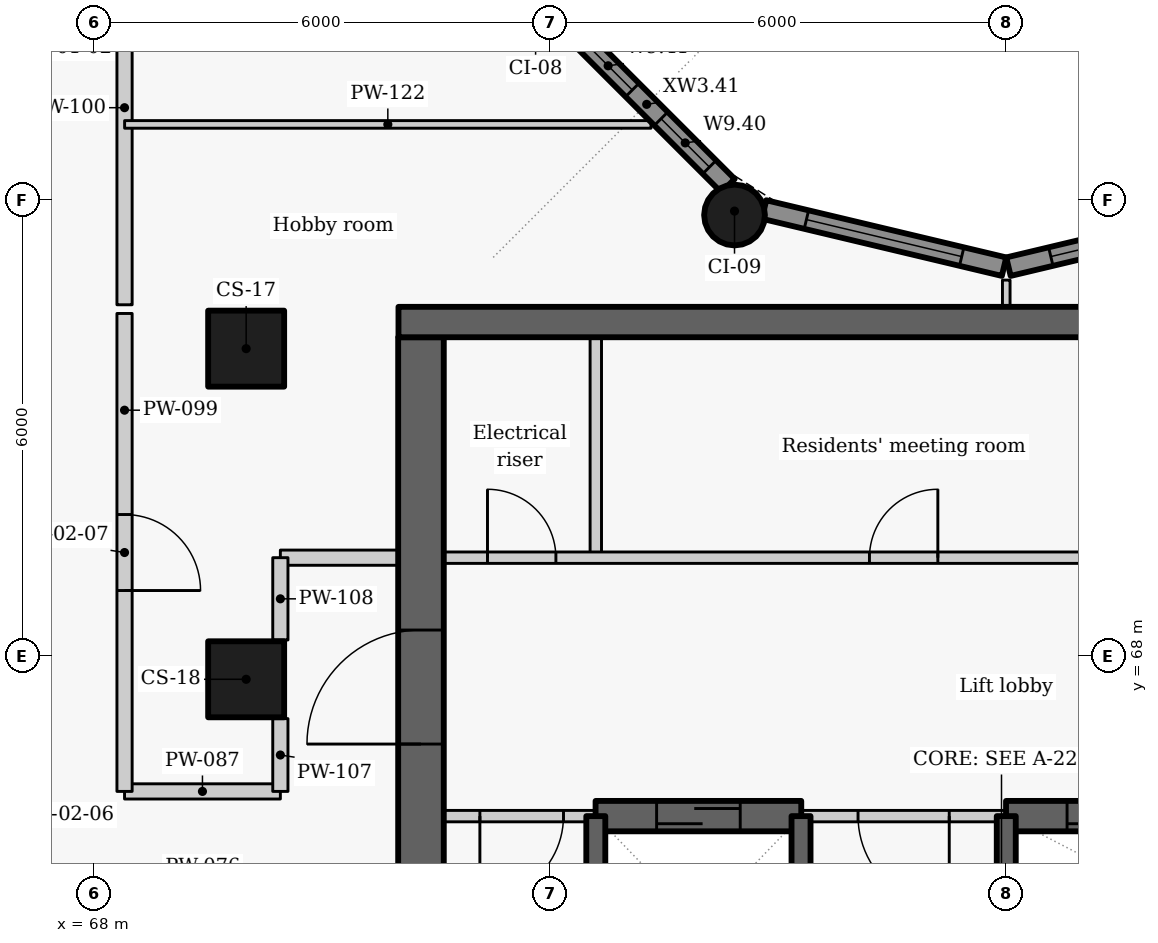
"""IFC4 building model, lengths in metres.
Left out: names, types, materials, properties, quantities, classifications, styles, units other than length and angle.
Written with IfcOpenShell. Run it as: python <this file> out.ifc"""

import sys

from ifc_helpers import new_model, si_unit, direction, frame, frame_2d, origin, origin_2d, place, context, subcontext, project, spatial, rectangle, circle, extrude, element, fill, save


model = new_model("IFC4")
c1 = context("Model", 3, precision=1e-05, world=origin(), true_north=direction((0.0, 1.0)))
c2 = subcontext(c1, "Body", "Model", "MODEL_VIEW")
j1 = project(units=[si_unit("LENGTHUNIT", "METRE"), si_unit("PLANEANGLEUNIT", "RADIAN")], contexts=[c1])
p1 = place(None, origin())
s1 = spatial("IfcSite", under=j1, at=p1, CompositionType="ELEMENT")
p2 = place(p1, origin())
s2 = spatial("IfcBuilding", under=s1, at=p2, CompositionType="ELEMENT")
p3 = place(p2, frame((0.0, 0.0, 150.3)))
s3 = spatial("IfcBuildingStorey", under=s2, at=p3, CompositionType="ELEMENT", Elevation=150.3)
for number, where, z_axis, x_axis in (
    (1, (70.0, 72.05, 0.0), (0.0, 0.0, 1.0), (0.0, -1.0, 0.0)),
    (2, (70.0, 67.7, 0.0), (0.0, 0.0, 1.0), (0.0, -1.0, 0.0)),
):
    element("IfcColumn", number, at=place(p3, frame(where, z_axis=z_axis, x_axis=x_axis)), inside=s3, PredefinedType="COLUMN", context=c2, shape_type="SweptSolid", body=[
        extrude(rectangle(XDim=1.0, YDim=1.0, at=origin_2d()), origin(), (0.0, 0.0, 1.0), 3.3),
    ])
p4 = place(p3, frame((76.425, 73.808, 0.0), z_axis=(0.0, 0.0, 1.0), x_axis=(0.866025403784, -0.5, 0.0)))
e3 = element("IfcColumn", 3, at=p4, inside=s3, PredefinedType="COLUMN", context=c2, shape_type="SweptSolid", body=[
    extrude(circle(Radius=0.4, at=origin_2d()), origin(), (0.0, 0.0, 1.0), 3.3),
])
p5 = place(p3, frame((83.186, 73.881, 0.0), z_axis=(0.0, 0.0, 1.0), x_axis=(-0.972773113459, -0.231759508395, 0.0)))
e4 = element("IfcWall", 4, at=p5, inside=s3, PredefinedType="SOLIDWALL", context=c2, shape_type="SweptSolid", body=[
    extrude(rectangle(XDim=3.246, YDim=0.25, at=frame_2d((1.623, 0.0))), origin(), (0.0, 0.0, 1.0), 2.425),
])
p6 = place(p5, frame((0.573, 0.0, 0.9)))
e5 = element("IfcOpeningElement", 5, at=p6, cuts=e4, PredefinedType="OPENING", context=c2, shape_type="SweptSolid", body=[
    extrude(rectangle(XDim=2.1, YDim=1.1, at=frame_2d((1.05, 0.55))), frame((0.0, 0.135, 0.0), z_axis=(0.0, -1.0, 0.0), x_axis=(1.0, 0.0, 0.0)), (0.0, 0.0, 1.0), 0.27),
])
p7 = place(p3, frame((79.971, 73.128, 0.0), z_axis=(0.0, 0.0, 1.0), x_axis=(-0.972773113459, 0.231759508395, 0.0)))
e6 = element("IfcWall", 6, at=p7, inside=s3, PredefinedType="SOLIDWALL", context=c2, shape_type="SweptSolid", body=[
    extrude(rectangle(XDim=3.246, YDim=0.25, at=frame_2d((1.623, 0.0))), origin(), (0.0, 0.0, 1.0), 2.425),
])
p8 = place(p7, frame((0.573, 0.0, 0.9)))
e7 = element("IfcOpeningElement", 7, at=p8, cuts=e6, PredefinedType="OPENING", context=c2, shape_type="SweptSolid", body=[
    extrude(rectangle(XDim=2.1, YDim=1.1, at=frame_2d((1.05, 0.55))), frame((0.0, 0.135, 0.0), z_axis=(0.0, -1.0, 0.0), x_axis=(1.0, 0.0, 0.0)), (0.0, 0.0, 1.0), 0.27),
])
p9 = place(p3, frame((76.339, 74.194, 0.0), z_axis=(0.0, 0.0, 1.0), x_axis=(-0.707106781187, 0.707106781187, 0.0)))
e8 = element("IfcWall", 8, at=p9, inside=s3, PredefinedType="SOLIDWALL", context=c2, shape_type="SweptSolid", body=[
    extrude(rectangle(XDim=3.033, YDim=0.25, at=frame_2d((1.517, 0.0))), origin(), (0.0, 0.0, 1.0), 2.425),
])
p10 = place(p9, frame((0.345, 0.0, 0.9)))
e9 = element("IfcOpeningElement", 9, at=p10, cuts=e8, PredefinedType="OPENING", context=c2, shape_type="SweptSolid", body=[
    extrude(rectangle(XDim=0.9, YDim=1.1, at=frame_2d((0.45, 0.55))), frame((0.0, 0.135, 0.0), z_axis=(0.0, -1.0, 0.0), x_axis=(1.0, 0.0, 0.0)), (0.0, 0.0, 1.0), 0.27),
])
p11 = place(p9, frame((1.78, 0.0, 0.9)))
e10 = element("IfcOpeningElement", 10, at=p11, cuts=e8, PredefinedType="OPENING", context=c2, shape_type="SweptSolid", body=[
    extrude(rectangle(XDim=0.9, YDim=1.1, at=frame_2d((0.45, 0.55))), frame((0.0, 0.135, 0.0), z_axis=(0.0, -1.0, 0.0), x_axis=(1.0, 0.0, 0.0)), (0.0, 0.0, 1.0), 0.27),
])
p12 = place(p3, frame((74.6, 69.3, 0.0), z_axis=(0.0, 0.0, 1.0), x_axis=(0.0, 1.0, 0.0)))
e11 = element("IfcWall", 11, at=p12, inside=s3, PredefinedType="PARTITIONING", context=c2, shape_type="SweptSolid", body=[
    extrude(rectangle(XDim=2.9, YDim=0.15, at=frame_2d((1.45, 0.0))), origin(), (0.0, 0.0, 1.0), 3.025),
])
p13 = place(p3, frame((72.0, 69.3, 0.0), z_axis=(0.0, 0.0, 1.0), x_axis=(1.0, 0.0, 0.0)))
e12 = element("IfcWall", 12, at=p13, inside=s3, PredefinedType="PARTITIONING", context=c2, shape_type="SweptSolid", body=[
    extrude(rectangle(XDim=13.4, YDim=0.15, at=frame_2d((6.7, 0.0))), origin(), (0.0, 0.0, 1.0), 3.025),
])
p14 = place(p13, frame((1.175, 0.0, 0.0)))
e13 = element("IfcOpeningElement", 13, at=p14, cuts=e12, PredefinedType="OPENING", context=c2, shape_type="SweptSolid", body=[
    extrude(rectangle(XDim=0.9, YDim=2.1, at=frame_2d((0.45, 1.05))), frame((0.0, 0.085, 0.0), z_axis=(0.0, -1.0, 0.0), x_axis=(1.0, 0.0, 0.0)), (0.0, 0.0, 1.0), 0.17),
])
p15 = place(p13, frame((6.2, 0.0, 0.0)))
e14 = element("IfcOpeningElement", 14, at=p15, cuts=e12, PredefinedType="OPENING", context=c2, shape_type="SweptSolid", body=[
    extrude(rectangle(XDim=0.9, YDim=2.1, at=frame_2d((0.45, 1.05))), frame((0.0, 0.085, 0.0), z_axis=(0.0, -1.0, 0.0), x_axis=(1.0, 0.0, 0.0)), (0.0, 0.0, 1.0), 0.17),
])
p16 = place(p13, frame((11.6, 0.0, 0.0)))
e15 = element("IfcOpeningElement", 15, at=p16, cuts=e12, PredefinedType="OPENING", context=c2, shape_type="SweptSolid", body=[
    extrude(rectangle(XDim=0.9, YDim=2.1, at=frame_2d((0.45, 1.05))), frame((0.0, 0.085, 0.0), z_axis=(0.0, -1.0, 0.0), x_axis=(1.0, 0.0, 0.0)), (0.0, 0.0, 1.0), 0.17),
])
p17 = place(p3, frame((72.3, 63.1, -0.275), z_axis=(0.0, 0.0, 1.0), x_axis=(0.0, 1.0, 0.0)))
e16 = element("IfcWall", 16, at=p17, inside=s3, PredefinedType="SHEAR", context=c2, shape_type="SweptSolid", body=[
    extrude(rectangle(XDim=9.1, YDim=0.6, at=frame_2d((4.55, 0.0))), origin(), (0.0, 0.0, 1.0), 3.3),
])
p18 = place(p17, frame((3.748, 0.0, 0.275)))
e17 = element("IfcOpeningElement", 17, at=p18, cuts=e16, PredefinedType="OPENING", context=c2, shape_type="SweptSolid", body=[
    extrude(rectangle(XDim=1.5, YDim=2.1, at=frame_2d((0.75, 1.05))), frame((0.0, 0.31, 0.0), z_axis=(0.0, -1.0, 0.0), x_axis=(1.0, 0.0, 0.0)), (0.0, 0.0, 1.0), 0.62),
])
p19 = place(p3, frame((74.603, 65.9, 0.0), z_axis=(0.0, 0.0, 1.0), x_axis=(-1.0, 0.0, 0.0)))
e18 = element("IfcWall", 18, at=p19, inside=s3, PredefinedType="PARTITIONING", context=c2, shape_type="SweptSolid", body=[
    extrude(rectangle(XDim=2.603, YDim=0.15, at=frame_2d((1.302, 0.0))), origin(), (0.0, 0.0, 1.0), 3.025),
])
p20 = place(p19, frame((0.428, 0.0, 0.0)))
e19 = element("IfcOpeningElement", 19, at=p20, cuts=e18, PredefinedType="OPENING", context=c2, shape_type="SweptSolid", body=[
    extrude(rectangle(XDim=1.1, YDim=2.1, at=frame_2d((0.55, 1.05))), frame((0.0, 0.085, 0.0), z_axis=(0.0, -1.0, 0.0), x_axis=(1.0, 0.0, 0.0)), (0.0, 0.0, 1.0), 0.17),
])
p21 = place(p3, frame((80.003, 65.9, 0.0), z_axis=(0.0, 0.0, 1.0), x_axis=(-1.0, 0.0, 0.0)))
e20 = element("IfcWall", 20, at=p21, inside=s3, PredefinedType="PARTITIONING", context=c2, shape_type="SweptSolid", body=[
    extrude(rectangle(XDim=2.706, YDim=0.15, at=frame_2d((1.353, 0.0))), origin(), (0.0, 0.0, 1.0), 3.025),
])
p22 = place(p21, frame((0.753, 0.0, 0.0)))
e21 = element("IfcOpeningElement", 21, at=p22, cuts=e20, PredefinedType="OPENING", context=c2, shape_type="SweptSolid", body=[
    extrude(rectangle(XDim=1.2, YDim=2.1, at=frame_2d((0.6, 1.05))), frame((0.0, 0.085, 0.0), z_axis=(0.0, -1.0, 0.0), x_axis=(1.0, 0.0, 0.0)), (0.0, 0.0, 1.0), 0.17),
])
p23 = place(p3, frame((74.597, 65.9, -0.275), z_axis=(0.0, 0.0, 1.0), x_axis=(1.0, 0.0, 0.0)))
e22 = element("IfcWall", 22, at=p23, inside=s3, PredefinedType="SHEAR", context=c2, shape_type="SweptSolid", body=[
    extrude(rectangle(XDim=2.706, YDim=0.4, at=frame_2d((1.353, 0.0))), origin(), (0.0, 0.0, 1.0), 3.3),
])
p24 = place(p23, frame((0.803, 0.0, 0.275)))
e23 = element("IfcOpeningElement", 23, at=p24, cuts=e22, PredefinedType="OPENING", context=c2, shape_type="SweptSolid", body=[
    extrude(rectangle(XDim=1.1, YDim=2.1, at=frame_2d((0.55, 1.05))), frame((0.0, 0.21, 0.0), z_axis=(0.0, -1.0, 0.0), x_axis=(1.0, 0.0, 0.0)), (0.0, 0.0, 1.0), 0.42),
])
p25 = place(p3, frame((79.997, 65.9, -0.275), z_axis=(0.0, 0.0, 1.0), x_axis=(1.0, 0.0, 0.0)))
e24 = element("IfcWall", 24, at=p25, inside=s3, PredefinedType="SHEAR", context=c2, shape_type="SweptSolid", body=[
    extrude(rectangle(XDim=5.406, YDim=0.4, at=frame_2d((2.703, 0.0))), origin(), (0.0, 0.0, 1.0), 3.3),
])
p26 = place(p25, frame((0.803, 0.0, 0.275)))
e25 = element("IfcOpeningElement", 25, at=p26, cuts=e24, PredefinedType="OPENING", context=c2, shape_type="SweptSolid", body=[
    extrude(rectangle(XDim=1.1, YDim=2.1, at=frame_2d((0.55, 1.05))), frame((0.0, 0.21, 0.0), z_axis=(0.0, -1.0, 0.0), x_axis=(1.0, 0.0, 0.0)), (0.0, 0.0, 1.0), 0.42),
])
for number, where, z_axis, x_axis in (
    (26, (74.6, 63.1, -0.275), (0.0, 0.0, 1.0), (0.0, 1.0, 0.0)),
    (27, (77.3, 63.1, -0.275), (0.0, 0.0, 1.0), (0.0, 1.0, 0.0)),
    (28, (80.0, 63.1, -0.275), (0.0, 0.0, 1.0), (0.0, 1.0, 0.0)),
):
    element("IfcWall", number, at=place(p3, frame(where, z_axis=z_axis, x_axis=x_axis)), inside=s3, PredefinedType="SHEAR", context=c2, shape_type="SweptSolid", body=[
        extrude(rectangle(XDim=2.8, YDim=0.25, at=frame_2d((1.4, 0.0))), origin(), (0.0, 0.0, 1.0), 3.3),
    ])
p27 = place(p3, frame((70.45, 69.3, 0.0), z_axis=(0.0, 0.0, 1.0), x_axis=(1.0, 0.0, 0.0)))
e29 = element("IfcWall", 29, at=p27, inside=s3, PredefinedType="PARTITIONING", context=c2, shape_type="SweptSolid", body=[
    extrude(rectangle(XDim=1.55, YDim=0.2, at=frame_2d((0.775, 0.0))), origin(), (0.0, 0.0, 1.0), 3.025),
])
p28 = place(p3, frame((68.4, 66.225, 0.0), z_axis=(0.0, 0.0, 1.0), x_axis=(1.0, 0.0, 0.0)))
e30 = element("IfcWall", 30, at=p28, inside=s3, PredefinedType="PARTITIONING", context=c2, shape_type="SweptSolid", body=[
    extrude(rectangle(XDim=2.05, YDim=0.2, at=frame_2d((1.025, 0.0))), origin(), (0.0, 0.0, 1.0), 2.505),
])
p29 = place(p3, frame((68.4, 72.513, 0.0), z_axis=(0.0, 0.0, 1.0), x_axis=(0.0, -1.0, 0.0)))
e31 = element("IfcWall", 31, at=p29, inside=s3, PredefinedType="PARTITIONING", context=c2, shape_type="SweptSolid", body=[
    extrude(rectangle(XDim=6.288, YDim=0.2, at=frame_2d((3.144, 0.0))), origin(), (0.0, 0.0, 1.0), 3.025),
])
p30 = place(p29, frame((2.645, 0.0, 0.0)))
e32 = element("IfcOpeningElement", 32, at=p30, cuts=e31, PredefinedType="OPENING", context=c2, shape_type="SweptSolid", body=[
    extrude(rectangle(XDim=1.0, YDim=2.1, at=frame_2d((0.5, 1.05))), frame((0.0, 0.11, 0.0), z_axis=(0.0, -1.0, 0.0), x_axis=(1.0, 0.0, 0.0)), (0.0, 0.0, 1.0), 0.22),
])
p31 = place(p3, frame((68.4, 72.627, 0.0), z_axis=(0.0, 0.0, 1.0), x_axis=(0.0, 1.0, 0.0)))
e33 = element("IfcWall", 33, at=p31, inside=s3, PredefinedType="PARTITIONING", context=c2, shape_type="SweptSolid", body=[
    extrude(rectangle(XDim=5.186, YDim=0.2, at=frame_2d((2.593, 0.0))), origin(), (0.0, 0.0, 1.0), 3.025),
])
p32 = place(p3, frame((70.45, 66.225, 0.0), z_axis=(0.0, 0.0, 1.0), x_axis=(0.0, 1.0, 0.0)))
e34 = element("IfcWall", 34, at=p32, inside=s3, PredefinedType="PARTITIONING", context=c2, shape_type="SweptSolid", body=[
    extrude(rectangle(XDim=0.958, YDim=0.2, at=frame_2d((0.479, 0.0))), origin(), (0.0, 0.0, 1.0), 3.025),
])
p33 = place(p3, frame((70.45, 68.217, 0.0), z_axis=(0.0, 0.0, 1.0), x_axis=(0.0, 1.0, 0.0)))
e35 = element("IfcWall", 35, at=p33, inside=s3, PredefinedType="PARTITIONING", context=c2, shape_type="SweptSolid", body=[
    extrude(rectangle(XDim=1.083, YDim=0.2, at=frame_2d((0.542, 0.0))), origin(), (0.0, 0.0, 1.0), 3.025),
])
p34 = place(p3, frame((80.0, 72.6, 0.0), z_axis=(0.0, 0.0, 1.0), x_axis=(0.0, 1.0, 0.0)))
e36 = element("IfcWall", 36, at=p34, inside=s3, PredefinedType="PARTITIONING", context=c2, shape_type="SweptSolid", body=[
    extrude(rectangle(XDim=0.352, YDim=0.1, at=frame_2d((0.176, 0.0))), origin(), (0.0, 0.0, 1.0), 3.025),
])
p35 = place(p3, frame((68.401, 75.0, 0.0), z_axis=(0.0, 0.0, 1.0), x_axis=(1.0, 0.0, 0.0)))
e37 = element("IfcWall", 37, at=p35, inside=s3, PredefinedType="PARTITIONING", context=c2, shape_type="SweptSolid", body=[
    extrude(rectangle(XDim=6.926, YDim=0.1, at=frame_2d((3.463, 0.0))), origin(), (0.0, 0.0, 1.0), 2.505),
])
p36 = place(p3, frame((72.004, 72.4, -0.275), z_axis=(0.0, 0.0, 1.0), x_axis=(1.0, 0.0, 0.0)))
e38 = element("IfcWall", 38, at=p36, inside=s3, PredefinedType="SHEAR", context=c2, shape_type="SweptSolid", body=[
    extrude(rectangle(XDim=15.992, YDim=0.4, at=frame_2d((7.996, 0.0))), origin(), (0.0, 0.0, 1.0), 3.3),
])
p37 = place(p6, origin())
e39 = element("IfcWindow", 39, at=p37, inside=s3, PartitioningType="SINGLE_PANEL", PredefinedType="WINDOW", context=c2, shape_type="SweptSolid", body=[
    extrude(rectangle(XDim=2.1, YDim=1.1, at=frame_2d((1.05, 0.55))), frame((0.0, 0.03, 0.0), z_axis=(0.0, -1.0, 0.0), x_axis=(1.0, 0.0, 0.0)), (0.0, 0.0, 1.0), 0.06),
])
fill(e5, e39)
p38 = place(p8, origin())
e40 = element("IfcWindow", 40, at=p38, inside=s3, PartitioningType="SINGLE_PANEL", PredefinedType="WINDOW", context=c2, shape_type="SweptSolid", body=[
    extrude(rectangle(XDim=2.1, YDim=1.1, at=frame_2d((1.05, 0.55))), frame((0.0, 0.03, 0.0), z_axis=(0.0, -1.0, 0.0), x_axis=(1.0, 0.0, 0.0)), (0.0, 0.0, 1.0), 0.06),
])
fill(e7, e40)
p39 = place(p10, origin())
e41 = element("IfcWindow", 41, at=p39, inside=s3, PartitioningType="SINGLE_PANEL", PredefinedType="WINDOW", context=c2, shape_type="SweptSolid", body=[
    extrude(rectangle(XDim=0.9, YDim=1.1, at=frame_2d((0.45, 0.55))), frame((0.0, 0.03, 0.0), z_axis=(0.0, -1.0, 0.0), x_axis=(1.0, 0.0, 0.0)), (0.0, 0.0, 1.0), 0.06),
])
fill(e9, e41)
p40 = place(p11, origin())
e42 = element("IfcWindow", 42, at=p40, inside=s3, PartitioningType="SINGLE_PANEL", PredefinedType="WINDOW", context=c2, shape_type="SweptSolid", body=[
    extrude(rectangle(XDim=0.9, YDim=1.1, at=frame_2d((0.45, 0.55))), frame((0.0, 0.03, 0.0), z_axis=(0.0, -1.0, 0.0), x_axis=(1.0, 0.0, 0.0)), (0.0, 0.0, 1.0), 0.06),
])
fill(e10, e42)
p41 = place(p14, origin())
e43 = element("IfcDoor", 43, at=p41, inside=s3, OperationType="SINGLE_SWING_LEFT", PredefinedType="DOOR", context=c2, shape_type="SweptSolid", body=[
    extrude(rectangle(XDim=0.9, YDim=2.1, at=frame_2d((0.45, 1.05))), frame((0.0, 0.025, 0.0), z_axis=(0.0, -1.0, 0.0), x_axis=(1.0, 0.0, 0.0)), (0.0, 0.0, 1.0), 0.05),
])
fill(e13, e43)
p42 = place(p15, origin())
e44 = element("IfcDoor", 44, at=p42, inside=s3, OperationType="SINGLE_SWING_RIGHT", PredefinedType="DOOR", context=c2, shape_type="SweptSolid", body=[
    extrude(rectangle(XDim=0.9, YDim=2.1, at=frame_2d((0.45, 1.05))), frame((0.0, 0.025, 0.0), z_axis=(0.0, -1.0, 0.0), x_axis=(1.0, 0.0, 0.0)), (0.0, 0.0, 1.0), 0.05),
])
fill(e14, e44)
p43 = place(p20, origin())
e45 = element("IfcDoor", 45, at=p43, inside=s3, OperationType="SINGLE_SWING_RIGHT", PredefinedType="DOOR", context=c2, shape_type="SweptSolid", body=[
    extrude(rectangle(XDim=1.1, YDim=2.1, at=frame_2d((0.55, 1.05))), frame((0.0, 0.025, 0.0), z_axis=(0.0, -1.0, 0.0), x_axis=(1.0, 0.0, 0.0)), (0.0, 0.0, 1.0), 0.05),
])
fill(e19, e45)
p44 = place(p24, origin())
e46 = element("IfcDoor", 46, at=p44, inside=s3, OperationType="SLIDING_TO_LEFT", PredefinedType="DOOR", context=c2, shape_type="SweptSolid", body=[
    extrude(rectangle(XDim=1.1, YDim=2.1, at=frame_2d((0.55, 1.05))), frame((0.0, 0.025, 0.0), z_axis=(0.0, -1.0, 0.0), x_axis=(1.0, 0.0, 0.0)), (0.0, 0.0, 1.0), 0.05),
])
fill(e23, e46)
p45 = place(p22, origin())
e47 = element("IfcDoor", 47, at=p45, inside=s3, OperationType="DOUBLE_DOOR_SINGLE_SWING", PredefinedType="DOOR", context=c2, shape_type="SweptSolid", body=[
    extrude(rectangle(XDim=1.2, YDim=2.1, at=frame_2d((0.6, 1.05))), frame((0.0, 0.025, 0.0), z_axis=(0.0, -1.0, 0.0), x_axis=(1.0, 0.0, 0.0)), (0.0, 0.0, 1.0), 0.05),
])
fill(e21, e47)
p46 = place(p26, origin())
e48 = element("IfcDoor", 48, at=p46, inside=s3, OperationType="SLIDING_TO_LEFT", PredefinedType="DOOR", context=c2, shape_type="SweptSolid", body=[
    extrude(rectangle(XDim=1.1, YDim=2.1, at=frame_2d((0.55, 1.05))), frame((0.0, 0.025, 0.0), z_axis=(0.0, -1.0, 0.0), x_axis=(1.0, 0.0, 0.0)), (0.0, 0.0, 1.0), 0.05),
])
fill(e25, e48)
p47 = place(p30, origin())
e49 = element("IfcDoor", 49, at=p47, inside=s3, OperationType="SINGLE_SWING_RIGHT", PredefinedType="DOOR", context=c2, shape_type="SweptSolid", body=[
    extrude(rectangle(XDim=1.0, YDim=2.1, at=frame_2d((0.5, 1.05))), frame((0.0, 0.025, 0.0), z_axis=(0.0, -1.0, 0.0), x_axis=(1.0, 0.0, 0.0)), (0.0, 0.0, 1.0), 0.05),
])
fill(e32, e49)
p48 = place(p18, origin())
e50 = element("IfcDoor", 50, at=p48, inside=s3, OperationType="DOUBLE_DOOR_SINGLE_SWING", PredefinedType="DOOR", context=c2, shape_type="SweptSolid", body=[
    extrude(rectangle(XDim=1.5, YDim=2.1, at=frame_2d((0.75, 1.05))), frame((0.0, 0.025, 0.0), z_axis=(0.0, -1.0, 0.0), x_axis=(1.0, 0.0, 0.0)), (0.0, 0.0, 1.0), 0.05),
])
fill(e17, e50)
save(model, sys.argv[1])
